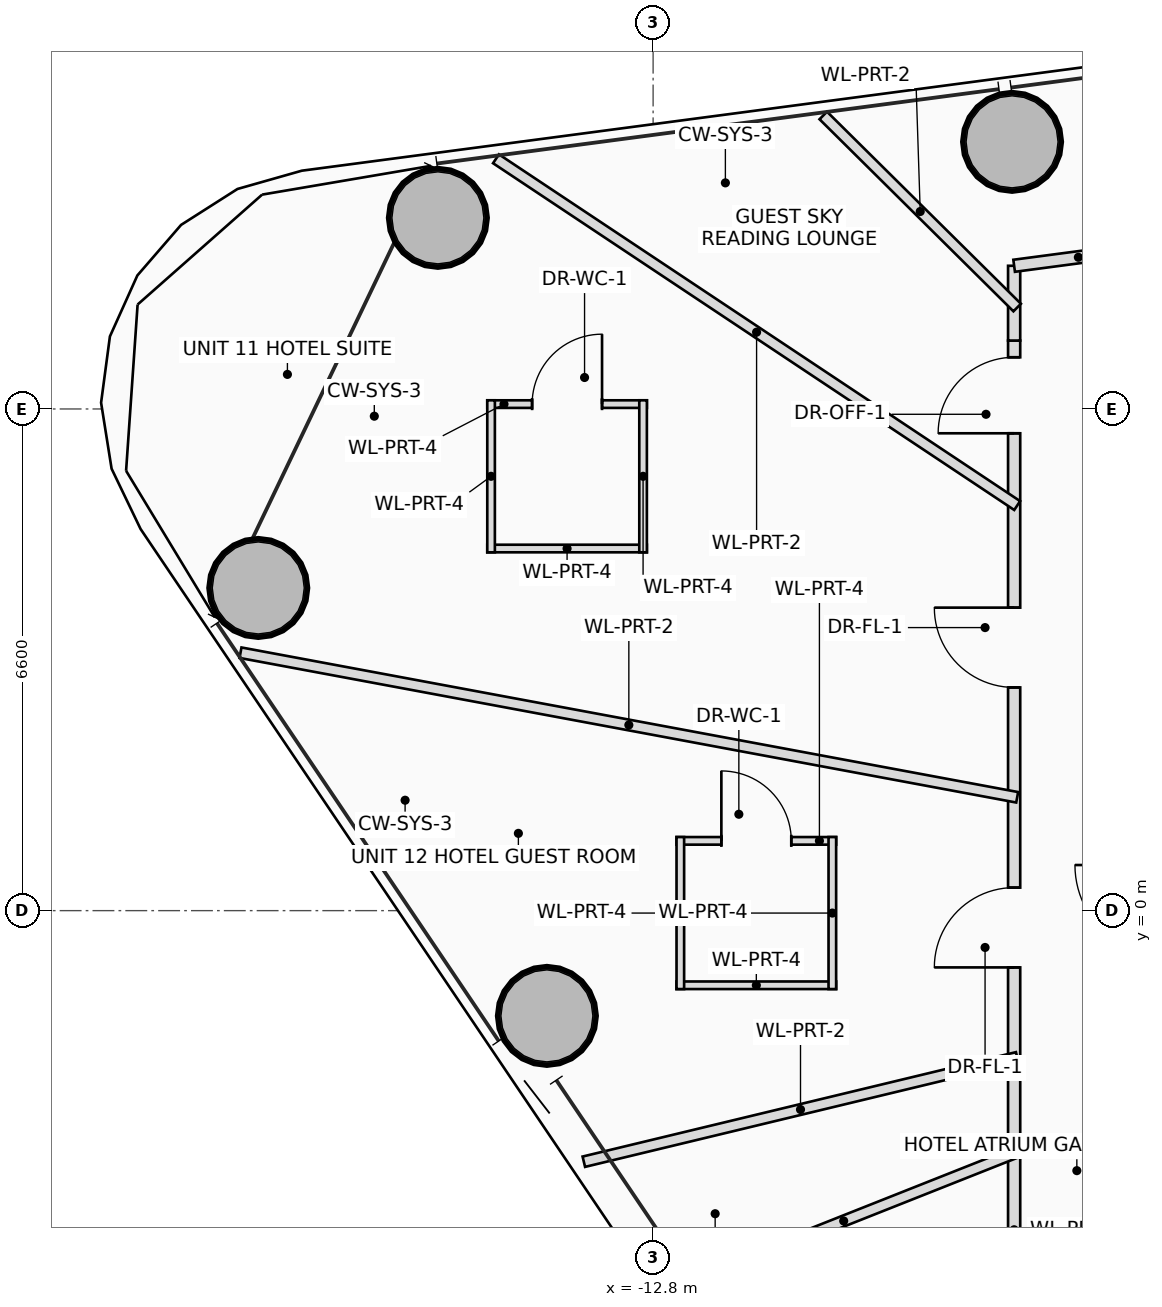
"""IFC4 building model, lengths in metres.
Left out: names, types, materials, properties, quantities, classifications, styles, units other than length and angle.
Written with IfcOpenShell. Run it as: python <this file> out.ifc"""

import sys

from ifc_helpers import new_model, si_unit, direction, frame, frame_2d, origin, origin_2d, place, context, subcontext, project, spatial, rectangle, hollow_circle, extrude, source, transform, mapped, element, fill, save


model = new_model("IFC4")
c1 = context("Model", 3, precision=1e-05, world=origin(), true_north=direction((0.0, 1.0)))
c2 = subcontext(c1, "Body", "Model", "MODEL_VIEW")
j1 = project(units=[si_unit("LENGTHUNIT", "METRE"), si_unit("PLANEANGLEUNIT", "RADIAN")], contexts=[c1])
p1 = place(None, origin())
s1 = spatial("IfcSite", under=j1, at=p1, CompositionType="ELEMENT")
p2 = place(p1, origin())
s2 = spatial("IfcBuilding", under=s1, at=p2, CompositionType="ELEMENT")
p3 = place(p2, frame((0.0, 0.0, 158.75)))
s3 = spatial("IfcBuildingStorey", under=s2, at=p3, CompositionType="ELEMENT", Elevation=158.75)
m1 = source(origin(), c2, "Body", "SweptSolid", [
    extrude(hollow_circle(Radius=0.65, WallThickness=0.045, at=origin_2d()), origin(), (0.0, 0.0, 1.0), 3.45),
])
for number, where, z_axis, x_axis in (
    (1, (-8.077, 10.114, 0.0), (0.0, 0.0, 1.0), (1.0, 0.0, 0.0)),
    (2, (-15.632, 9.114, 0.0), (0.0, 0.0, 1.0), (1.0, 0.0, 0.0)),
    (3, (-17.995, 4.245, 0.0), (0.0, 0.0, 1.0), (1.0, 0.0, 0.0)),
    (4, (-14.198, -1.385, 0.0), (0.0, 0.0, 1.0), (1.0, 0.0, 0.0)),
):
    element("IfcColumn", number, at=place(p3, frame(where, z_axis=z_axis, x_axis=x_axis)), inside=s3, PredefinedType="COLUMN", context=c2, shape_type="MappedRepresentation", body=[
        mapped(m1, transform((0.0, 0.0, 0.0), scale=1.0)),
    ])
p4 = place(p3, frame((-14.982, 6.664, 0.0), z_axis=(0.0, 0.0, 1.0), x_axis=(1.0, 0.0, 0.0)))
e5 = element("IfcWall", 5, at=p4, inside=s3, PredefinedType="PARTITIONING", context=c2, shape_type="SweptSolid", body=[
    extrude(rectangle(XDim=2.1, YDim=0.1, at=frame_2d((1.05, 0.0))), origin(), (0.0, 0.0, 1.0), 2.905),
])
p5 = place(p4, frame((0.59, 0.0, 0.0)))
e6 = element("IfcOpeningElement", 6, at=p5, cuts=e5, PredefinedType="OPENING", context=c2, shape_type="SweptSolid", body=[
    extrude(rectangle(XDim=0.92, YDim=2.1, at=frame_2d((0.46, 1.05))), frame((0.0, 0.06, 0.0), z_axis=(0.0, -1.0, 0.0), x_axis=(1.0, 0.0, 0.0)), (0.0, 0.0, 1.0), 0.12),
])
p6 = place(p3, frame((-12.882, 4.764, 0.0), z_axis=(0.0, 0.0, 1.0), x_axis=(-1.0, 0.0, 0.0)))
e7 = element("IfcWall", 7, at=p6, inside=s3, PredefinedType="PARTITIONING", context=c2, shape_type="SweptSolid", body=[
    extrude(rectangle(XDim=2.1, YDim=0.1, at=frame_2d((1.05, 0.0))), origin(), (0.0, 0.0, 1.0), 2.605),
])
p7 = place(p3, frame((-12.932, 6.714, 0.0), z_axis=(0.0, 0.0, 1.0), x_axis=(0.0, -1.0, 0.0)))
e8 = element("IfcWall", 8, at=p7, inside=s3, PredefinedType="PARTITIONING", context=c2, shape_type="SweptSolid", body=[
    extrude(rectangle(XDim=2.0, YDim=0.1, at=frame_2d((1.0, 0.0))), origin(), (0.0, 0.0, 1.0), 2.605),
])
p8 = place(p3, frame((-14.932, 4.714, 0.0), z_axis=(0.0, 0.0, 1.0), x_axis=(0.0, 1.0, 0.0)))
e9 = element("IfcWall", 9, at=p8, inside=s3, PredefinedType="PARTITIONING", context=c2, shape_type="SweptSolid", body=[
    extrude(rectangle(XDim=2.0, YDim=0.1, at=frame_2d((1.0, 0.0))), origin(), (0.0, 0.0, 1.0), 3.25),
])
p9 = place(p3, frame((-12.492, 0.918, 0.0), z_axis=(0.0, 0.0, 1.0), x_axis=(1.0, 0.0, 0.0)))
e10 = element("IfcWall", 10, at=p9, inside=s3, PredefinedType="PARTITIONING", context=c2, shape_type="SweptSolid", body=[
    extrude(rectangle(XDim=2.1, YDim=0.1, at=frame_2d((1.05, 0.0))), origin(), (0.0, 0.0, 1.0), 2.805),
])
p10 = place(p9, frame((0.59, 0.0, 0.0)))
e11 = element("IfcOpeningElement", 11, at=p10, cuts=e10, PredefinedType="OPENING", context=c2, shape_type="SweptSolid", body=[
    extrude(rectangle(XDim=0.92, YDim=2.1, at=frame_2d((0.46, 1.05))), frame((0.0, 0.06, 0.0), z_axis=(0.0, -1.0, 0.0), x_axis=(1.0, 0.0, 0.0)), (0.0, 0.0, 1.0), 0.12),
])
p11 = place(p3, frame((-10.392, -0.982, 0.0), z_axis=(0.0, 0.0, 1.0), x_axis=(-1.0, 0.0, 0.0)))
e12 = element("IfcWall", 12, at=p11, inside=s3, PredefinedType="PARTITIONING", context=c2, shape_type="SweptSolid", body=[
    extrude(rectangle(XDim=2.1, YDim=0.1, at=frame_2d((1.05, 0.0))), origin(), (0.0, 0.0, 1.0), 2.805),
])
for number, where, z_axis, x_axis in (
    (13, (-10.442, 0.968, 0.0), (0.0, 0.0, 1.0), (0.0, -1.0, 0.0)),
    (14, (-12.442, -1.032, 0.0), (0.0, 0.0, 1.0), (0.0, 1.0, 0.0)),
):
    element("IfcWall", number, at=place(p3, frame(where, z_axis=z_axis, x_axis=x_axis)), inside=s3, PredefinedType="PARTITIONING", context=c2, shape_type="SweptSolid", body=[
        extrude(rectangle(XDim=2.0, YDim=0.1, at=frame_2d((1.0, 0.0))), origin(), (0.0, 0.0, 1.0), 3.25),
    ])
p12 = place(p3, frame((-8.05, -7.5, 0.0), z_axis=(0.0, 0.0, 1.0), x_axis=(0.0, 1.0, 0.0)))
e15 = element("IfcWall", 15, at=p12, inside=s3, PredefinedType="PARTITIONING", context=c2, shape_type="SweptSolid", body=[
    extrude(rectangle(XDim=15.0, YDim=0.16, at=frame_2d((7.5, 0.0))), origin(), (0.0, 0.0, 1.0), 2.605),
])
p13 = place(p12, frame((6.753, 0.0, 0.0)))
e16 = element("IfcOpeningElement", 16, at=p13, cuts=e15, PredefinedType="OPENING", context=c2, shape_type="SweptSolid", body=[
    extrude(rectangle(XDim=1.05, YDim=2.2, at=frame_2d((0.525, 1.1))), frame((0.0, 0.09, 0.0), z_axis=(0.0, -1.0, 0.0), x_axis=(1.0, 0.0, 0.0)), (0.0, 0.0, 1.0), 0.18),
])
p14 = place(p12, frame((10.436, 0.0, 0.0)))
e17 = element("IfcOpeningElement", 17, at=p14, cuts=e15, PredefinedType="OPENING", context=c2, shape_type="SweptSolid", body=[
    extrude(rectangle(XDim=1.05, YDim=2.2, at=frame_2d((0.525, 1.1))), frame((0.0, 0.09, 0.0), z_axis=(0.0, -1.0, 0.0), x_axis=(1.0, 0.0, 0.0)), (0.0, 0.0, 1.0), 0.18),
])
p15 = place(p12, frame((13.78, 0.0, 0.0)))
e18 = element("IfcOpeningElement", 18, at=p15, cuts=e15, PredefinedType="OPENING", context=c2, shape_type="SweptSolid", body=[
    extrude(rectangle(XDim=1.0, YDim=2.25, at=frame_2d((0.5, 1.125))), frame((0.0, 0.09, 0.0), z_axis=(0.0, -1.0, 0.0), x_axis=(1.0, 0.0, 0.0)), (0.0, 0.0, 1.0), 0.18),
])
p16 = place(p3, frame((-8.05, 7.5, 0.0), z_axis=(0.0, 0.0, 1.0), x_axis=(0.0, 1.0, 0.0)))
e19 = element("IfcWall", 19, at=p16, inside=s3, PredefinedType="PARTITIONING", context=c2, shape_type="SweptSolid", body=[
    extrude(rectangle(XDim=0.984, YDim=0.16, at=frame_2d((0.492, 0.0))), origin(), (0.0, 0.0, 1.0), 2.805),
])
p17 = place(p3, frame((-8.05, 8.484, 0.0), z_axis=(0.0, 0.0, 1.0), x_axis=(0.991338869543, 0.131328769629, 0.0)))
e20 = element("IfcWall", 20, at=p17, inside=s3, PredefinedType="PARTITIONING", context=c2, shape_type="SweptSolid", body=[
    extrude(rectangle(XDim=1.705, YDim=0.16, at=frame_2d((0.852, 0.0))), origin(), (0.0, 0.0, 1.0), 2.605),
])
p18 = place(p3, frame((-8.01, 7.934, 0.0), z_axis=(0.0, 0.0, 1.0), x_axis=(-0.710464129117, 0.703733416315, 0.0)))
e21 = element("IfcWall", 21, at=p18, inside=s3, PredefinedType="PARTITIONING", context=c2, shape_type="SweptSolid", body=[
    extrude(rectangle(XDim=3.591, YDim=0.14, at=frame_2d((1.795, 0.0))), origin(), (0.0, 0.0, 1.0), 2.765),
])
p19 = place(p3, frame((-8.01, 5.329, 0.0), z_axis=(0.0, 0.0, 1.0), x_axis=(-0.832565256492, 0.553926975044, 0.0)))
e22 = element("IfcWall", 22, at=p19, inside=s3, PredefinedType="PARTITIONING", context=c2, shape_type="SweptSolid", body=[
    extrude(rectangle(XDim=8.236, YDim=0.14, at=frame_2d((4.118, 0.0))), origin(), (0.0, 0.0, 1.0), 2.605),
])
p20 = place(p3, frame((-8.01, 1.491, 0.0), z_axis=(0.0, 0.0, 1.0), x_axis=(-0.983113838534, 0.182995028575, 0.0)))
e23 = element("IfcWall", 23, at=p20, inside=s3, PredefinedType="PARTITIONING", context=c2, shape_type="SweptSolid", body=[
    extrude(rectangle(XDim=10.394, YDim=0.14, at=frame_2d((5.197, 0.0))), origin(), (0.0, 0.0, 1.0), 2.765),
])
p21 = place(p3, frame((-8.01, -1.93, 0.0), z_axis=(0.0, 0.0, 1.0), x_axis=(-0.972178712373, -0.23424037058, 0.0)))
e24 = element("IfcWall", 24, at=p21, inside=s3, PredefinedType="PARTITIONING", context=c2, shape_type="SweptSolid", body=[
    extrude(rectangle(XDim=5.865, YDim=0.14, at=frame_2d((2.932, 0.0))), origin(), (0.0, 0.0, 1.0), 2.605),
])
p22 = place(p3, frame((-8.01, -3.177, 0.0), z_axis=(0.0, 0.0, 1.0), x_axis=(-0.929545887112, -0.368706446586, 0.0)))
e25 = element("IfcWall", 25, at=p22, inside=s3, PredefinedType="PARTITIONING", context=c2, shape_type="SweptSolid", body=[
    extrude(rectangle(XDim=4.911, YDim=0.14, at=frame_2d((2.456, 0.0))), origin(), (0.0, 0.0, 1.0), 2.605),
])
p23 = place(p5, origin())
e26 = element("IfcDoor", 26, at=p23, inside=s3, OperationType="SINGLE_SWING_RIGHT", PredefinedType="DOOR", context=c2, shape_type="SweptSolid", body=[
    extrude(rectangle(XDim=0.92, YDim=2.1, at=frame_2d((0.46, 1.05))), frame((0.0, 0.025, 0.0), z_axis=(0.0, -1.0, 0.0), x_axis=(1.0, 0.0, 0.0)), (0.0, 0.0, 1.0), 0.05),
])
fill(e6, e26)
p24 = place(p10, origin())
e27 = element("IfcDoor", 27, at=p24, inside=s3, OperationType="SINGLE_SWING_LEFT", PredefinedType="DOOR", context=c2, shape_type="SweptSolid", body=[
    extrude(rectangle(XDim=0.92, YDim=2.1, at=frame_2d((0.46, 1.05))), frame((0.0, 0.025, 0.0), z_axis=(0.0, -1.0, 0.0), x_axis=(1.0, 0.0, 0.0)), (0.0, 0.0, 1.0), 0.05),
])
fill(e11, e27)
p25 = place(p13, origin())
e28 = element("IfcDoor", 28, at=p25, inside=s3, OperationType="SINGLE_SWING_LEFT", PredefinedType="DOOR", context=c2, shape_type="SweptSolid", body=[
    extrude(rectangle(XDim=1.05, YDim=2.2, at=frame_2d((0.525, 1.1))), frame((0.0, 0.025, 0.0), z_axis=(0.0, -1.0, 0.0), x_axis=(1.0, 0.0, 0.0)), (0.0, 0.0, 1.0), 0.05),
])
fill(e16, e28)
p26 = place(p14, origin())
e29 = element("IfcDoor", 29, at=p26, inside=s3, OperationType="SINGLE_SWING_RIGHT", PredefinedType="DOOR", context=c2, shape_type="SweptSolid", body=[
    extrude(rectangle(XDim=1.05, YDim=2.2, at=frame_2d((0.525, 1.1))), frame((0.0, 0.025, 0.0), z_axis=(0.0, -1.0, 0.0), x_axis=(1.0, 0.0, 0.0)), (0.0, 0.0, 1.0), 0.05),
])
fill(e17, e29)
p27 = place(p15, origin())
e30 = element("IfcDoor", 30, at=p27, inside=s3, OperationType="SINGLE_SWING_LEFT", PredefinedType="DOOR", context=c2, shape_type="SweptSolid", body=[
    extrude(rectangle(XDim=1.0, YDim=2.25, at=frame_2d((0.5, 1.125))), frame((0.0, 0.025, 0.0), z_axis=(0.0, -1.0, 0.0), x_axis=(1.0, 0.0, 0.0)), (0.0, 0.0, 1.0), 0.05),
])
fill(e18, e30)
save(model, sys.argv[1])
